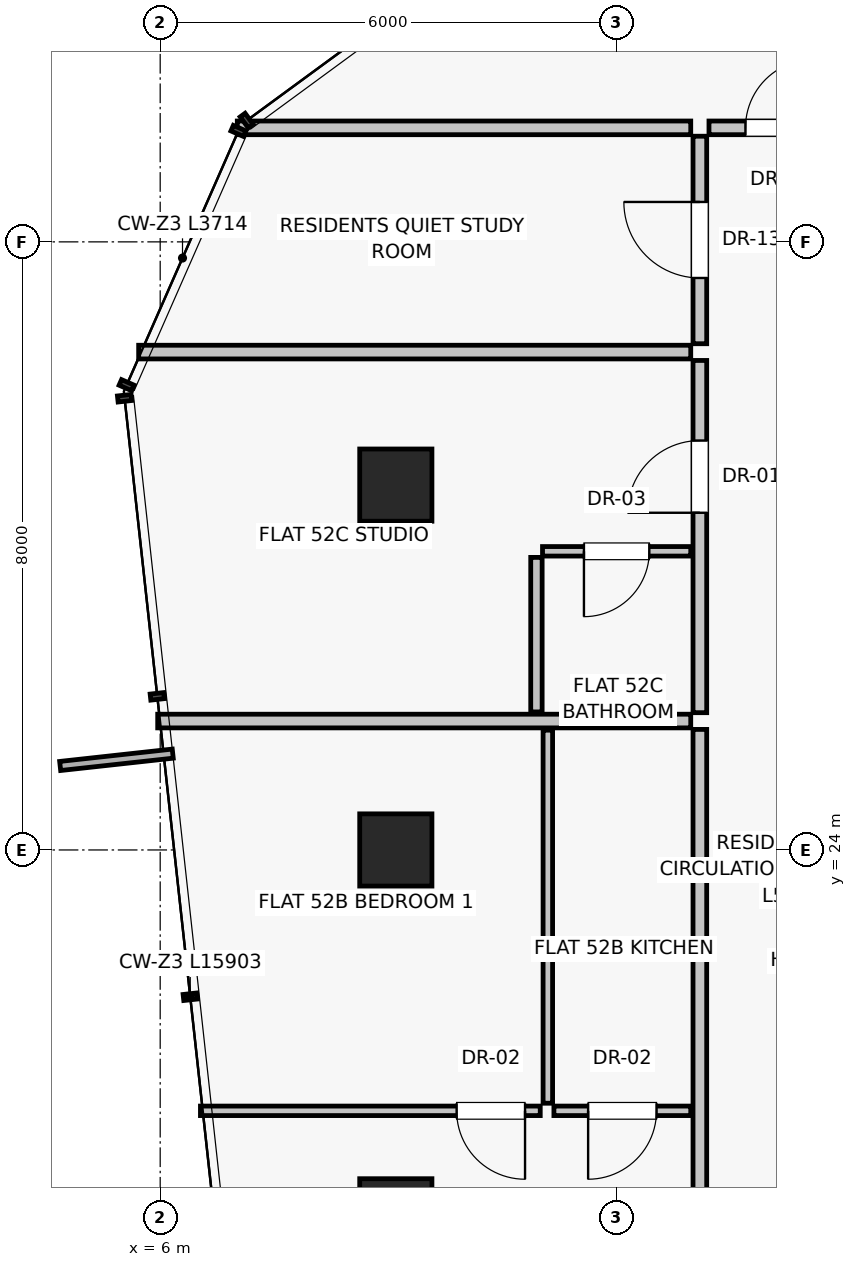
"""IFC4 building model, lengths in metres.
Left out: names, types, materials, properties, quantities, classifications, styles, units other than length and angle.
Written with IfcOpenShell. Run it as: python <this file> out.ifc"""

import sys

from ifc_helpers import new_model, si_unit, direction, frame, frame_2d, origin, origin_2d, place, context, subcontext, project, spatial, rectangle, extrude, source, transform, mapped, element, fill, save


model = new_model("IFC4")
c1 = context("Model", 3, precision=1e-05, world=origin(), true_north=direction((0.0, 1.0)))
c2 = subcontext(c1, "Body", "Model", "MODEL_VIEW")
j1 = project(units=[si_unit("LENGTHUNIT", "METRE"), si_unit("PLANEANGLEUNIT", "RADIAN")], contexts=[c1])
p1 = place(None, origin())
s1 = spatial("IfcSite", under=j1, at=p1, CompositionType="ELEMENT")
p2 = place(p1, origin())
s2 = spatial("IfcBuilding", under=s1, at=p2, CompositionType="ELEMENT")
p3 = place(p2, frame((0.0, 0.0, 185.35)))
s3 = spatial("IfcBuildingStorey", under=s2, at=p3, CompositionType="ELEMENT", Elevation=185.35)
for number, where, z_axis, x_axis in (
    (1, (9.1, 28.8, 0.0), (0.0, 0.0, 1.0), (1.0, 0.0, 0.0)),
    (2, (9.1, 24.0, 0.0), (0.0, 0.0, 1.0), (1.0, 0.0, 0.0)),
    (3, (9.1, 19.2, 0.0), (0.0, 0.0, 1.0), (1.0, 0.0, 0.0)),
):
    element("IfcColumn", number, at=place(p3, frame(where, z_axis=z_axis, x_axis=x_axis)), inside=s3, PredefinedType="COLUMN", context=c2, shape_type="SweptSolid", body=[
        extrude(rectangle(XDim=0.95, YDim=0.95, at=origin_2d()), origin(), (0.0, 0.0, 1.0), 3.25),
    ])
p4 = place(p3, frame((12.98, 33.5, 0.0), z_axis=(0.0, 0.0, 1.0), x_axis=(-1.0, 0.0, 0.0)))
e4 = element("IfcWall", 4, at=p4, inside=s3, PredefinedType="PARTITIONING", context=c2, shape_type="SweptSolid", body=[
    extrude(rectangle(XDim=5.966, YDim=0.18, at=frame_2d((2.983, 0.0))), origin(), (0.0, 0.0, 1.0), 3.015),
])
p5 = place(p3, frame((13.1, 14.41, 0.0), z_axis=(0.0, 0.0, 1.0), x_axis=(0.0, 1.0, 0.0)))
e5 = element("IfcWall", 5, at=p5, inside=s3, PredefinedType="PARTITIONING", context=c2, shape_type="SweptSolid", body=[
    extrude(rectangle(XDim=11.176, YDim=0.18, at=frame_2d((5.588, 0.0))), origin(), (0.0, 0.0, 1.0), 2.662),
])
p6 = place(p5, frame((3.674, 0.0, 0.0)))
e6 = element("IfcOpeningElement", 6, at=p6, cuts=e5, PredefinedType="OPENING", context=c2, shape_type="SweptSolid", body=[
    extrude(rectangle(XDim=0.95, YDim=2.02, at=frame_2d((0.475, 1.01))), frame((0.0, 0.1, 0.0), z_axis=(0.0, -1.0, 0.0), x_axis=(1.0, 0.0, 0.0)), (0.0, 0.0, 1.0), 0.2),
])
p7 = place(p3, frame((12.98, 20.568, 0.0), z_axis=(0.0, 0.0, 1.0), x_axis=(-1.0, 0.0, 0.0)))
e7 = element("IfcWall", 7, at=p7, inside=s3, PredefinedType="PARTITIONING", context=c2, shape_type="SweptSolid", body=[
    extrude(rectangle(XDim=1.8, YDim=0.125, at=frame_2d((0.9, 0.0))), origin(), (0.0, 0.0, 1.0), 3.015),
])
p8 = place(p7, frame((0.45, 0.0, 0.0)))
e8 = element("IfcOpeningElement", 8, at=p8, cuts=e7, PredefinedType="OPENING", context=c2, shape_type="SweptSolid", body=[
    extrude(rectangle(XDim=0.9, YDim=2.01, at=frame_2d((0.45, 1.005))), frame((0.0, 0.073, 0.0), z_axis=(0.0, -1.0, 0.0), x_axis=(1.0, 0.0, 0.0)), (0.0, 0.0, 1.0), 0.145),
])
p9 = place(p3, frame((11.1, 20.668, 0.0), z_axis=(0.0, 0.0, 1.0), x_axis=(0.0, 1.0, 0.0)))
e9 = element("IfcWall", 9, at=p9, inside=s3, PredefinedType="PARTITIONING", context=c2, shape_type="SweptSolid", body=[
    extrude(rectangle(XDim=4.908, YDim=0.125, at=frame_2d((2.454, 0.0))), origin(), (0.0, 0.0, 1.0), 3.015),
])
p10 = place(p3, frame((11.0, 20.568, 0.0), z_axis=(0.0, 0.0, 1.0), x_axis=(-1.0, 0.0, 0.0)))
e10 = element("IfcWall", 10, at=p10, inside=s3, PredefinedType="PARTITIONING", context=c2, shape_type="SweptSolid", body=[
    extrude(rectangle(XDim=4.47, YDim=0.125, at=frame_2d((2.235, 0.0))), origin(), (0.0, 0.0, 1.0), 3.015),
])
p11 = place(p10, frame((0.2, 0.0, 0.0)))
e11 = element("IfcOpeningElement", 11, at=p11, cuts=e10, PredefinedType="OPENING", context=c2, shape_type="SweptSolid", body=[
    extrude(rectangle(XDim=0.9, YDim=2.01, at=frame_2d((0.45, 1.005))), frame((0.0, 0.073, 0.0), z_axis=(0.0, -1.0, 0.0), x_axis=(1.0, 0.0, 0.0)), (0.0, 0.0, 1.0), 0.145),
])
p12 = place(p3, frame((12.98, 25.696, 0.0), z_axis=(0.0, 0.0, 1.0), x_axis=(-1.0, 0.0, 0.0)))
e12 = element("IfcWall", 12, at=p12, inside=s3, PredefinedType="PARTITIONING", context=c2, shape_type="SweptSolid", body=[
    extrude(rectangle(XDim=7.013, YDim=0.18, at=frame_2d((3.506, 0.0))), origin(), (0.0, 0.0, 1.0), 3.015),
])
p13 = place(p3, frame((13.1, 30.66, 0.0), z_axis=(0.0, 0.0, 1.0), x_axis=(0.0, 1.0, 0.0)))
e13 = element("IfcWall", 13, at=p13, inside=s3, PredefinedType="PARTITIONING", context=c2, shape_type="SweptSolid", body=[
    extrude(rectangle(XDim=2.73, YDim=0.18, at=frame_2d((1.365, 0.0))), origin(), (0.0, 0.0, 1.0), 3.015),
])
p14 = place(p13, frame((0.865, 0.0, 0.0)))
e14 = element("IfcOpeningElement", 14, at=p14, cuts=e13, PredefinedType="OPENING", context=c2, shape_type="SweptSolid", body=[
    extrude(rectangle(XDim=1.0, YDim=2.01, at=frame_2d((0.5, 1.005))), frame((0.0, 0.1, 0.0), z_axis=(0.0, -1.0, 0.0), x_axis=(1.0, 0.0, 0.0)), (0.0, 0.0, 1.0), 0.2),
])
p15 = place(p3, frame((12.98, 30.55, 0.0), z_axis=(0.0, 0.0, 1.0), x_axis=(-1.0, 0.0, 0.0)))
e15 = element("IfcWall", 15, at=p15, inside=s3, PredefinedType="PARTITIONING", context=c2, shape_type="SweptSolid", body=[
    extrude(rectangle(XDim=7.263, YDim=0.18, at=frame_2d((3.632, 0.0))), origin(), (0.0, 0.0, 1.0), 3.015),
])
p16 = place(p3, frame((13.1, 25.806, 0.0), z_axis=(0.0, 0.0, 1.0), x_axis=(0.0, 1.0, 0.0)))
e16 = element("IfcWall", 16, at=p16, inside=s3, PredefinedType="PARTITIONING", context=c2, shape_type="SweptSolid", body=[
    extrude(rectangle(XDim=4.634, YDim=0.18, at=frame_2d((2.317, 0.0))), origin(), (0.0, 0.0, 1.0), 2.662),
])
p17 = place(p16, frame((2.63, 0.0, 0.0)))
e17 = element("IfcOpeningElement", 17, at=p17, cuts=e16, PredefinedType="OPENING", context=c2, shape_type="SweptSolid", body=[
    extrude(rectangle(XDim=0.95, YDim=2.02, at=frame_2d((0.475, 1.01))), frame((0.0, 0.1, 0.0), z_axis=(0.0, -1.0, 0.0), x_axis=(1.0, 0.0, 0.0)), (0.0, 0.0, 1.0), 0.2),
])
p18 = place(p3, frame((12.98, 27.929, 0.0), z_axis=(0.0, 0.0, 1.0), x_axis=(-1.0, 0.0, 0.0)))
e18 = element("IfcWall", 18, at=p18, inside=s3, PredefinedType="PARTITIONING", context=c2, shape_type="SweptSolid", body=[
    extrude(rectangle(XDim=1.95, YDim=0.125, at=frame_2d((0.975, 0.0))), origin(), (0.0, 0.0, 1.0), 3.015),
])
p19 = place(p18, frame((0.545, 0.0, 0.0)))
e19 = element("IfcOpeningElement", 19, at=p19, cuts=e18, PredefinedType="OPENING", context=c2, shape_type="SweptSolid", body=[
    extrude(rectangle(XDim=0.86, YDim=2.01, at=frame_2d((0.43, 1.005))), frame((0.0, 0.073, 0.0), z_axis=(0.0, -1.0, 0.0), x_axis=(1.0, 0.0, 0.0)), (0.0, 0.0, 1.0), 0.145),
])
p20 = place(p3, frame((10.95, 25.816, 0.0), z_axis=(0.0, 0.0, 1.0), x_axis=(0.0, 1.0, 0.0)))
e20 = element("IfcWall", 20, at=p20, inside=s3, PredefinedType="PARTITIONING", context=c2, shape_type="SweptSolid", body=[
    extrude(rectangle(XDim=2.033, YDim=0.15, at=frame_2d((1.017, 0.0))), origin(), (0.0, 0.0, 1.0), 3.015),
])
p21 = place(p3, frame((13.22, 33.5, 0.0), z_axis=(0.0, 0.0, 1.0), x_axis=(1.0, 0.0, 0.0)))
e21 = element("IfcWall", 21, at=p21, inside=s3, PredefinedType="PARTITIONING", context=c2, shape_type="SweptSolid", body=[
    extrude(rectangle(XDim=1.86, YDim=0.18, at=frame_2d((0.93, 0.0))), origin(), (0.0, 0.0, 1.0), 3.015),
])
p22 = place(p21, frame((0.48, 0.0, 0.0)))
e22 = element("IfcOpeningElement", 22, at=p22, cuts=e21, PredefinedType="OPENING", context=c2, shape_type="SweptSolid", body=[
    extrude(rectangle(XDim=0.9, YDim=2.01, at=frame_2d((0.45, 1.005))), frame((0.0, 0.1, 0.0), z_axis=(0.0, -1.0, 0.0), x_axis=(1.0, 0.0, 0.0)), (0.0, 0.0, 1.0), 0.2),
])
m1 = source(origin(), c2, "Body", "SweptSolid", [
    extrude(rectangle(XDim=0.9, YDim=2.01, at=frame_2d((0.45, 1.005))), frame((0.0, 0.025, 0.0), z_axis=(0.0, -1.0, 0.0), x_axis=(1.0, 0.0, 0.0)), (0.0, 0.0, 1.0), 0.05),
])
p23 = place(p8, origin())
e23 = element("IfcDoor", 23, at=p23, inside=s3, OperationType="SINGLE_SWING_RIGHT", PredefinedType="DOOR", context=c2, shape_type="MappedRepresentation", body=[
    mapped(m1, transform((0.0, 0.0, 0.0), scale=1.0)),
])
fill(e8, e23)
p24 = place(p11, origin())
e24 = element("IfcDoor", 24, at=p24, inside=s3, OperationType="SINGLE_SWING_LEFT", PredefinedType="DOOR", context=c2, shape_type="MappedRepresentation", body=[
    mapped(m1, transform((0.0, 0.0, 0.0), scale=1.0)),
])
fill(e11, e24)
m2 = source(origin(), c2, "Body", "SweptSolid", [
    extrude(rectangle(XDim=1.0, YDim=2.01, at=frame_2d((0.5, 1.005))), frame((0.0, 0.025, 0.0), z_axis=(0.0, -1.0, 0.0), x_axis=(1.0, 0.0, 0.0)), (0.0, 0.0, 1.0), 0.05),
])
p25 = place(p14, origin())
e25 = element("IfcDoor", 25, at=p25, inside=s3, OperationType="SINGLE_SWING_RIGHT", PredefinedType="DOOR", context=c2, shape_type="MappedRepresentation", body=[
    mapped(m2, transform((0.0, 0.0, 0.0), scale=1.0)),
])
fill(e14, e25)
m3 = source(origin(), c2, "Body", "SweptSolid", [
    extrude(rectangle(XDim=0.95, YDim=2.02, at=frame_2d((0.475, 1.01))), frame((0.0, 0.025, 0.0), z_axis=(0.0, -1.0, 0.0), x_axis=(1.0, 0.0, 0.0)), (0.0, 0.0, 1.0), 0.05),
])
p26 = place(p17, origin())
e26 = element("IfcDoor", 26, at=p26, inside=s3, OperationType="SINGLE_SWING_LEFT", PredefinedType="DOOR", context=c2, shape_type="MappedRepresentation", body=[
    mapped(m3, transform((0.0, 0.0, 0.0), scale=1.0)),
])
fill(e17, e26)
m4 = source(origin(), c2, "Body", "SweptSolid", [
    extrude(rectangle(XDim=0.86, YDim=2.01, at=frame_2d((0.43, 1.005))), frame((0.0, 0.025, 0.0), z_axis=(0.0, -1.0, 0.0), x_axis=(1.0, 0.0, 0.0)), (0.0, 0.0, 1.0), 0.05),
])
p27 = place(p19, origin())
e27 = element("IfcDoor", 27, at=p27, inside=s3, OperationType="SINGLE_SWING_RIGHT", PredefinedType="DOOR", context=c2, shape_type="MappedRepresentation", body=[
    mapped(m4, transform((0.0, 0.0, 0.0), scale=1.0)),
])
fill(e19, e27)
p28 = place(p22, origin())
e28 = element("IfcDoor", 28, at=p28, inside=s3, OperationType="SINGLE_SWING_RIGHT", PredefinedType="DOOR", context=c2, shape_type="MappedRepresentation", body=[
    mapped(m1, transform((0.0, 0.0, 0.0), scale=1.0)),
])
fill(e22, e28)
save(model, sys.argv[1])
